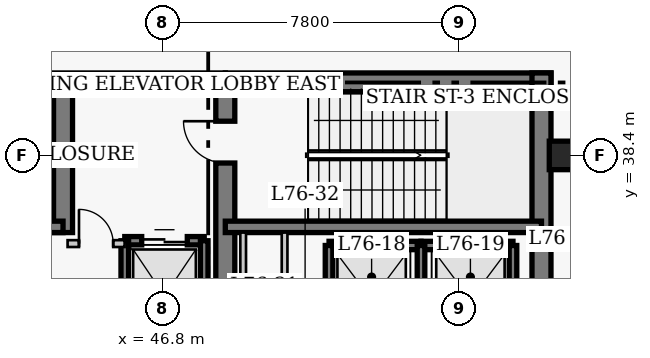
"""IFC4 building model, lengths in metres.
Left out: names, types, materials, properties, quantities, classifications, styles, units other than length and angle.
Written with IfcOpenShell. Run it as: python <this file> out.ifc"""

import sys

from ifc_helpers import new_model, si_unit, direction, frame, frame_2d, origin, origin_2d, place, context, subcontext, project, spatial, rectangle, extrude, element, fill, save


model = new_model("IFC4")
c1 = context("Model", 3, precision=1e-05, world=origin(), true_north=direction((0.0, 1.0)))
c2 = subcontext(c1, "Body", "Model", "MODEL_VIEW")
j1 = project(units=[si_unit("LENGTHUNIT", "METRE"), si_unit("PLANEANGLEUNIT", "RADIAN")], contexts=[c1])
p1 = place(None, origin())
s1 = spatial("IfcSite", under=j1, at=p1, CompositionType="ELEMENT")
p2 = place(p1, origin())
s2 = spatial("IfcBuilding", under=s1, at=p2, CompositionType="ELEMENT")
p3 = place(p2, frame((0.0, 0.0, 306.6)))
s3 = spatial("IfcBuildingStorey", under=s2, at=p3, CompositionType="ELEMENT", Elevation=306.6)
p4 = place(p3, frame((35.85, 40.32, 0.0), z_axis=(0.0, 0.0, 1.0), x_axis=(1.0, 0.0, 0.0)))
e1 = element("IfcWall", 1, at=p4, inside=s3, PredefinedType="SHEAR", context=c2, shape_type="SweptSolid", body=[
    extrude(rectangle(XDim=12.6, YDim=0.5, at=frame_2d((6.3, 0.0))), origin(), (0.0, 0.0, 1.0), 4.8),
])
p5 = place(p3, frame((48.45, 40.32, 0.0), z_axis=(0.0, 0.0, 1.0), x_axis=(1.0, 0.0, 0.0)))
e2 = element("IfcWall", 2, at=p5, inside=s3, PredefinedType="SHEAR", context=c2, shape_type="SweptSolid", body=[
    extrude(rectangle(XDim=8.57, YDim=0.5, at=frame_2d((4.285, 0.0))), origin(), (0.0, 0.0, 1.0), 4.8),
])
p6 = place(p3, frame((56.77, 27.05, 0.0), z_axis=(0.0, 0.0, 1.0), x_axis=(0.0, 1.0, 0.0)))
e3 = element("IfcWall", 3, at=p6, inside=s3, PredefinedType="SHEAR", context=c2, shape_type="SweptSolid", body=[
    extrude(rectangle(XDim=13.52, YDim=0.5, at=frame_2d((6.76, 0.0))), origin(), (0.0, 0.0, 1.0), 4.8),
])
p7 = place(p3, frame((44.18, 36.37, 0.0), z_axis=(0.0, 0.0, 1.0), x_axis=(0.0, 1.0, 0.0)))
e4 = element("IfcWall", 4, at=p7, inside=s3, PredefinedType="SHEAR", context=c2, shape_type="SweptSolid", body=[
    extrude(rectangle(XDim=3.95, YDim=0.5, at=frame_2d((1.975, 0.0))), origin(), (0.0, 0.0, 1.0), 4.8),
])
p8 = place(p3, frame((48.45, 32.5, 0.0), z_axis=(0.0, 0.0, 1.0), x_axis=(0.0, 1.0, 0.0)))
e5 = element("IfcWall", 5, at=p8, inside=s3, PredefinedType="SHEAR", context=c2, shape_type="SweptSolid", body=[
    extrude(rectangle(XDim=7.82, YDim=0.5, at=frame_2d((3.91, 0.0))), origin(), (0.0, 0.0, 1.0), 4.8),
])
p9 = place(p8, frame((5.7, 0.0, 0.0)))
e6 = element("IfcOpeningElement", 6, at=p9, cuts=e5, PredefinedType="OPENING", context=c2, shape_type="SweptSolid", body=[
    extrude(rectangle(XDim=1.1, YDim=2.15, at=frame_2d((0.55, 1.075))), frame((0.0, 0.26, 0.0), z_axis=(0.0, -1.0, 0.0), x_axis=(1.0, 0.0, 0.0)), (0.0, 0.0, 1.0), 0.52),
])
p10 = place(p3, frame((35.85, 36.52, 0.0), z_axis=(0.0, 0.0, 1.0), x_axis=(1.0, 0.0, 0.0)))
e7 = element("IfcWall", 7, at=p10, inside=s3, PredefinedType="SHEAR", context=c2, shape_type="SweptSolid", body=[
    extrude(rectangle(XDim=8.33, YDim=0.3, at=frame_2d((4.165, 0.0))), origin(), (0.0, 0.0, 1.0), 4.8),
])
p11 = place(p3, frame((48.45, 36.52, 0.0), z_axis=(0.0, 0.0, 1.0), x_axis=(1.0, 0.0, 0.0)))
e8 = element("IfcWall", 8, at=p11, inside=s3, PredefinedType="SHEAR", context=c2, shape_type="SweptSolid", body=[
    extrude(rectangle(XDim=8.32, YDim=0.3, at=frame_2d((4.16, 0.0))), origin(), (0.0, 0.0, 1.0), 4.8),
])
p12 = place(p3, frame((57.35, 38.4, 0.0), z_axis=(0.0, 0.0, 1.0), x_axis=(1.0, 0.0, 0.0)))
e9 = element("IfcColumn", 9, at=p12, inside=s3, PredefinedType="COLUMN", context=c2, shape_type="SweptSolid", body=[
    extrude(rectangle(XDim=0.75, YDim=0.75, at=origin_2d()), origin(), (0.0, 0.0, 1.0), 4.8),
])
p13 = place(p3, frame((51.18, 36.03, 0.0), z_axis=(0.0, 0.0, 1.0), x_axis=(1.0, 0.0, 0.0)))
e10 = element("IfcWall", 10, at=p13, inside=s3, PredefinedType="SHEAR", context=c2, shape_type="SweptSolid", body=[
    extrude(rectangle(XDim=2.42, YDim=0.22, at=frame_2d((1.21, 0.0))), origin(), (0.0, 0.0, 1.0), 4.8),
])
p14 = place(p3, frame((51.18, 33.17, 0.0), z_axis=(0.0, 0.0, 1.0), x_axis=(0.0, 1.0, 0.0)))
e11 = element("IfcWall", 11, at=p14, inside=s3, PredefinedType="SHEAR", context=c2, shape_type="SweptSolid", body=[
    extrude(rectangle(XDim=2.86, YDim=0.2, at=frame_2d((1.43, 0.0))), origin(), (0.0, 0.0, 1.0), 4.8),
])
p15 = place(p3, frame((53.6, 36.03, 0.0), z_axis=(0.0, 0.0, 1.0), x_axis=(1.0, 0.0, 0.0)))
e12 = element("IfcWall", 12, at=p15, inside=s3, PredefinedType="SHEAR", context=c2, shape_type="SweptSolid", body=[
    extrude(rectangle(XDim=2.42, YDim=0.22, at=frame_2d((1.21, 0.0))), origin(), (0.0, 0.0, 1.0), 4.8),
])
for number, where, z_axis, x_axis in (
    (13, (53.6, 33.17, 0.0), (0.0, 0.0, 1.0), (0.0, 1.0, 0.0)),
    (14, (56.02, 33.17, 0.0), (0.0, 0.0, 1.0), (0.0, 1.0, 0.0)),
):
    element("IfcWall", number, at=place(p3, frame(where, z_axis=z_axis, x_axis=x_axis)), inside=s3, PredefinedType="SHEAR", context=c2, shape_type="SweptSolid", body=[
        extrude(rectangle(XDim=2.86, YDim=0.2, at=frame_2d((1.43, 0.0))), origin(), (0.0, 0.0, 1.0), 4.8),
    ])
p16 = place(p3, frame((45.805, 36.155, 0.0), z_axis=(0.0, 0.0, 1.0), x_axis=(1.0, 0.0, 0.0)))
e15 = element("IfcWall", 15, at=p16, inside=s3, PredefinedType="SHEAR", context=c2, shape_type="SweptSolid", body=[
    extrude(rectangle(XDim=2.09, YDim=0.22, at=frame_2d((1.045, 0.0))), origin(), (0.0, 0.0, 1.0), 4.8),
])
p17 = place(p16, frame((0.445, 0.0, 0.0)))
e16 = element("IfcOpeningElement", 16, at=p17, cuts=e15, PredefinedType="OPENING", context=c2, shape_type="SweptSolid", body=[
    extrude(rectangle(XDim=1.2, YDim=2.15, at=frame_2d((0.6, 1.075))), frame((0.0, 0.12, 0.0), z_axis=(0.0, -1.0, 0.0), x_axis=(1.0, 0.0, 0.0)), (0.0, 0.0, 1.0), 0.24),
])
p18 = place(p3, frame((45.805, 32.65, 0.0), z_axis=(0.0, 0.0, 1.0), x_axis=(0.0, 1.0, 0.0)))
e17 = element("IfcWall", 17, at=p18, inside=s3, PredefinedType="SHEAR", context=c2, shape_type="SweptSolid", body=[
    extrude(rectangle(XDim=3.505, YDim=0.2, at=frame_2d((1.752, 0.0))), origin(), (0.0, 0.0, 1.0), 4.8),
])
p19 = place(p3, frame((47.895, 33.245, 0.0), z_axis=(0.0, 0.0, 1.0), x_axis=(0.0, 1.0, 0.0)))
e18 = element("IfcWall", 18, at=p19, inside=s3, PredefinedType="SHEAR", context=c2, shape_type="SweptSolid", body=[
    extrude(rectangle(XDim=2.91, YDim=0.2, at=frame_2d((1.455, 0.0))), origin(), (0.0, 0.0, 1.0), 4.8),
])
p20 = place(p3, frame((44.3, 36.08, 0.0), z_axis=(0.0, 0.0, 1.0), x_axis=(1.0, 0.0, 0.0)))
e19 = element("IfcWall", 19, at=p20, inside=s3, PredefinedType="PARTITIONING", context=c2, shape_type="SweptSolid", body=[
    extrude(rectangle(XDim=1.5, YDim=0.18, at=frame_2d((0.75, 0.0))), origin(), (0.0, 0.0, 1.0), 4.45),
])
p21 = place(p20, frame((0.3, 0.0, 0.0)))
e20 = element("IfcOpeningElement", 20, at=p21, cuts=e19, PredefinedType="OPENING", context=c2, shape_type="SweptSolid", body=[
    extrude(rectangle(XDim=0.9, YDim=2.15, at=frame_2d((0.45, 1.075))), frame((0.0, 0.1, 0.0), z_axis=(0.0, -1.0, 0.0), x_axis=(1.0, 0.0, 0.0)), (0.0, 0.0, 1.0), 0.2),
])
for number, where, z_axis, x_axis in (
    (21, (48.92, 32.75, 0.0), (0.0, 0.0, 1.0), (0.0, 1.0, 0.0)),
    (22, (50.01, 32.75, 0.0), (0.0, 0.0, 1.0), (0.0, 1.0, 0.0)),
):
    element("IfcWall", number, at=place(p3, frame(where, z_axis=z_axis, x_axis=x_axis)), inside=s3, PredefinedType="PARTITIONING", context=c2, shape_type="SweptSolid", body=[
        extrude(rectangle(XDim=3.62, YDim=0.15, at=frame_2d((1.81, 0.0))), origin(), (0.0, 0.0, 1.0), 4.45),
    ])
p22 = place(p17, origin())
e23 = element("IfcDoor", 23, at=p22, inside=s3, OperationType="DOUBLE_DOOR_SLIDING", PredefinedType="DOOR", context=c2, shape_type="SweptSolid", body=[
    extrude(rectangle(XDim=1.2, YDim=2.15, at=frame_2d((0.6, 1.075))), frame((0.0, 0.025, 0.0), z_axis=(0.0, -1.0, 0.0), x_axis=(1.0, 0.0, 0.0)), (0.0, 0.0, 1.0), 0.05),
])
fill(e16, e23)
p23 = place(p21, origin())
e24 = element("IfcDoor", 24, at=p23, inside=s3, OperationType="SINGLE_SWING_LEFT", PredefinedType="DOOR", context=c2, shape_type="SweptSolid", body=[
    extrude(rectangle(XDim=0.9, YDim=2.15, at=frame_2d((0.45, 1.075))), frame((0.0, 0.025, 0.0), z_axis=(0.0, -1.0, 0.0), x_axis=(1.0, 0.0, 0.0)), (0.0, 0.0, 1.0), 0.05),
])
fill(e20, e24)
p24 = place(p9, origin())
e25 = element("IfcDoor", 25, at=p24, inside=s3, OperationType="SINGLE_SWING_RIGHT", PredefinedType="DOOR", context=c2, shape_type="SweptSolid", body=[
    extrude(rectangle(XDim=1.1, YDim=2.15, at=frame_2d((0.55, 1.075))), frame((0.0, 0.025, 0.0), z_axis=(0.0, -1.0, 0.0), x_axis=(1.0, 0.0, 0.0)), (0.0, 0.0, 1.0), 0.05),
])
fill(e6, e25)
save(model, sys.argv[1])
